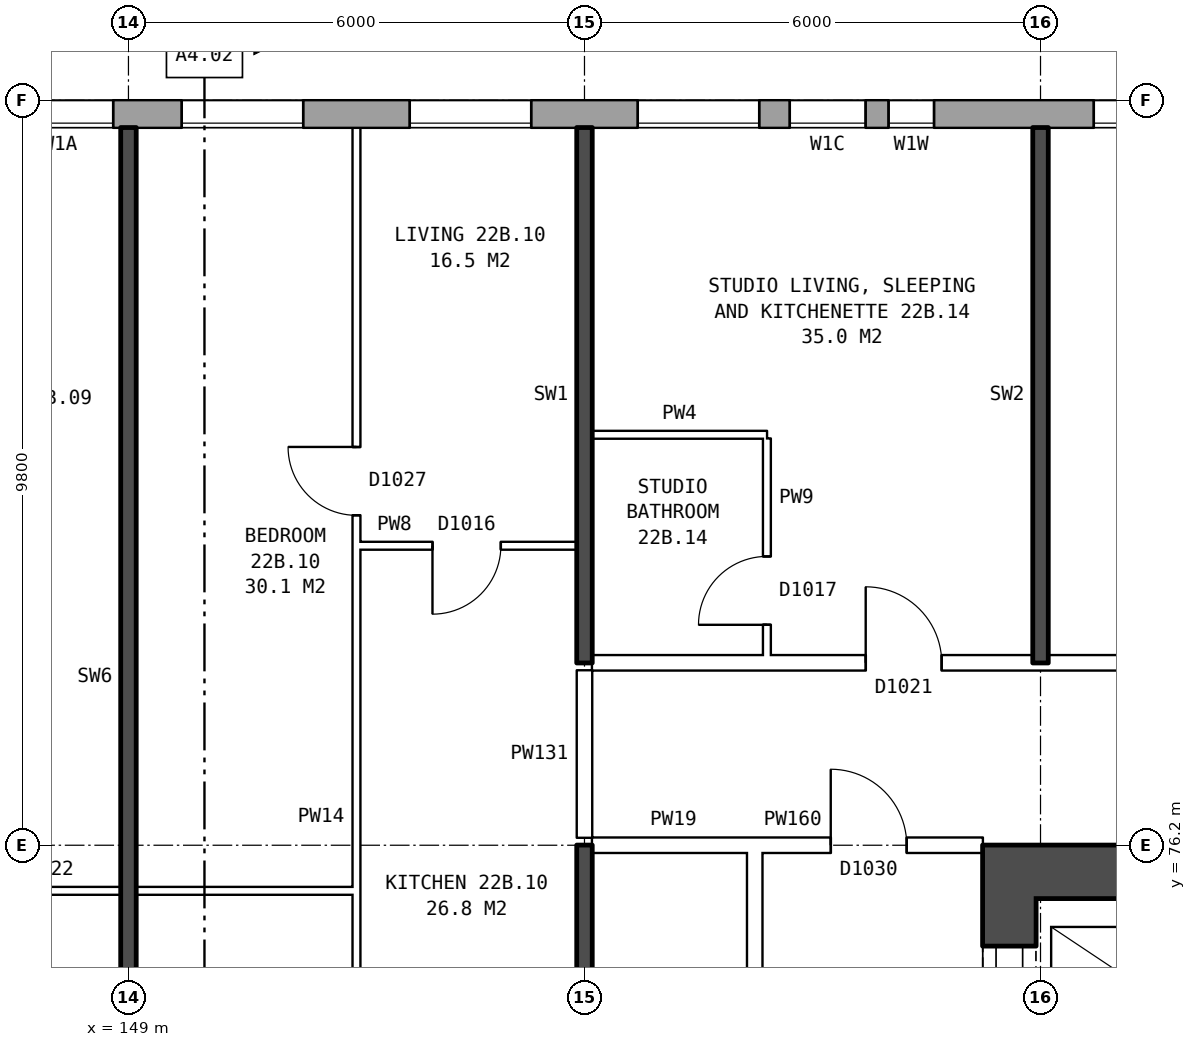
"""IFC4 building model, lengths in metres.
Left out: names, types, materials, properties, quantities, classifications, styles, units other than length and angle.
Written with IfcOpenShell. Run it as: python <this file> out.ifc"""

import sys

from ifc_helpers import new_model, si_unit, direction, frame, frame_2d, origin, place, context, subcontext, project, spatial, rectangle, extrude, element, fill, save


model = new_model("IFC4")
c1 = context("Model", 3, precision=1e-05, world=origin(), true_north=direction((0.0, 1.0)))
c2 = subcontext(c1, "Body", "Model", "MODEL_VIEW")
j1 = project(units=[si_unit("LENGTHUNIT", "METRE"), si_unit("PLANEANGLEUNIT", "RADIAN")], contexts=[c1])
p1 = place(None, origin())
s1 = spatial("IfcSite", under=j1, at=p1, CompositionType="ELEMENT")
p2 = place(p1, origin())
s2 = spatial("IfcBuilding", under=s1, at=p2, CompositionType="ELEMENT")
p3 = place(p2, frame((0.0, 0.0, 80.9)))
s3 = spatial("IfcBuildingStorey", under=s2, at=p3, CompositionType="ELEMENT", Elevation=80.9)
p4 = place(p3, frame((172.175, 85.82, 0.0), z_axis=(0.0, 0.0, 1.0), x_axis=(-1.0, 0.0, 0.0)))
e1 = element("IfcWall", 1, at=p4, inside=s3, PredefinedType="STANDARD", context=c2, shape_type="SweptSolid", body=[
    extrude(rectangle(XDim=38.101, YDim=0.36, at=frame_2d((19.05, 0.0))), origin(), (0.0, 0.0, 1.0), 2.85),
])
p5 = place(p4, frame((2.875, 0.0, 0.8)))
e2 = element("IfcOpeningElement", 2, at=p5, cuts=e1, PredefinedType="OPENING", context=c2, shape_type="SweptSolid", body=[
    extrude(rectangle(XDim=1.6, YDim=1.8, at=frame_2d((0.8, 0.9))), frame((0.0, 0.19, 0.0), z_axis=(0.0, -1.0, 0.0), x_axis=(1.0, 0.0, 0.0)), (0.0, 0.0, 1.0), 0.38),
])
p6 = place(p4, frame((5.875, 0.0, 0.8)))
e3 = element("IfcOpeningElement", 3, at=p6, cuts=e1, PredefinedType="OPENING", context=c2, shape_type="SweptSolid", body=[
    extrude(rectangle(XDim=1.6, YDim=1.8, at=frame_2d((0.8, 0.9))), frame((0.0, 0.19, 0.0), z_axis=(0.0, -1.0, 0.0), x_axis=(1.0, 0.0, 0.0)), (0.0, 0.0, 1.0), 0.38),
])
p7 = place(p4, frame((8.875, 0.0, 0.8)))
e4 = element("IfcOpeningElement", 4, at=p7, cuts=e1, PredefinedType="OPENING", context=c2, shape_type="SweptSolid", body=[
    extrude(rectangle(XDim=1.6, YDim=1.8, at=frame_2d((0.8, 0.9))), frame((0.0, 0.19, 0.0), z_axis=(0.0, -1.0, 0.0), x_axis=(1.0, 0.0, 0.0)), (0.0, 0.0, 1.0), 0.38),
])
p8 = place(p4, frame((12.575, 0.0, 0.8)))
e5 = element("IfcOpeningElement", 5, at=p8, cuts=e1, PredefinedType="OPENING", context=c2, shape_type="SweptSolid", body=[
    extrude(rectangle(XDim=0.6, YDim=0.9, at=frame_2d((0.3, 0.45))), frame((0.0, 0.19, 0.0), z_axis=(0.0, -1.0, 0.0), x_axis=(1.0, 0.0, 0.0)), (0.0, 0.0, 1.0), 0.38),
])
p9 = place(p4, frame((14.875, 0.0, 0.8)))
e6 = element("IfcOpeningElement", 6, at=p9, cuts=e1, PredefinedType="OPENING", context=c2, shape_type="SweptSolid", body=[
    extrude(rectangle(XDim=1.6, YDim=1.8, at=frame_2d((0.8, 0.9))), frame((0.0, 0.19, 0.0), z_axis=(0.0, -1.0, 0.0), x_axis=(1.0, 0.0, 0.0)), (0.0, 0.0, 1.0), 0.38),
])
p10 = place(p4, frame((17.875, 0.0, 0.8)))
e7 = element("IfcOpeningElement", 7, at=p10, cuts=e1, PredefinedType="OPENING", context=c2, shape_type="SweptSolid", body=[
    extrude(rectangle(XDim=1.6, YDim=1.8, at=frame_2d((0.8, 0.9))), frame((0.0, 0.19, 0.0), z_axis=(0.0, -1.0, 0.0), x_axis=(1.0, 0.0, 0.0)), (0.0, 0.0, 1.0), 0.38),
])
p11 = place(p4, frame((20.875, 0.0, 0.8)))
e8 = element("IfcOpeningElement", 8, at=p11, cuts=e1, PredefinedType="OPENING", context=c2, shape_type="SweptSolid", body=[
    extrude(rectangle(XDim=1.6, YDim=1.8, at=frame_2d((0.8, 0.9))), frame((0.0, 0.19, 0.0), z_axis=(0.0, -1.0, 0.0), x_axis=(1.0, 0.0, 0.0)), (0.0, 0.0, 1.0), 0.38),
])
p12 = place(p4, frame((23.375, 0.0, 0.65)))
e9 = element("IfcOpeningElement", 9, at=p12, cuts=e1, PredefinedType="OPENING", context=c2, shape_type="SweptSolid", body=[
    extrude(rectangle(XDim=1.4, YDim=1.8, at=frame_2d((0.7, 0.9))), frame((0.0, 0.19, 0.0), z_axis=(0.0, -1.0, 0.0), x_axis=(1.0, 0.0, 0.0)), (0.0, 0.0, 1.0), 0.38),
])
p13 = place(p4, frame((26.675, 0.0, 1.7)))
e10 = element("IfcOpeningElement", 10, at=p13, cuts=e1, PredefinedType="OPENING", context=c2, shape_type="SweptSolid", body=[
    extrude(rectangle(XDim=0.6, YDim=0.9, at=frame_2d((0.3, 0.45))), frame((0.0, 0.19, 0.0), z_axis=(0.0, -1.0, 0.0), x_axis=(1.0, 0.0, 0.0)), (0.0, 0.0, 1.0), 0.38),
])
p14 = place(p4, frame((29.875, 0.0, 0.8)))
e11 = element("IfcOpeningElement", 11, at=p14, cuts=e1, PredefinedType="OPENING", context=c2, shape_type="SweptSolid", body=[
    extrude(rectangle(XDim=1.6, YDim=1.8, at=frame_2d((0.8, 0.9))), frame((0.0, 0.19, 0.0), z_axis=(0.0, -1.0, 0.0), x_axis=(1.0, 0.0, 0.0)), (0.0, 0.0, 1.0), 0.38),
])
p15 = place(p4, frame((32.875, 0.0, 0.8)))
e12 = element("IfcOpeningElement", 12, at=p15, cuts=e1, PredefinedType="OPENING", context=c2, shape_type="SweptSolid", body=[
    extrude(rectangle(XDim=1.6, YDim=1.8, at=frame_2d((0.8, 0.9))), frame((0.0, 0.19, 0.0), z_axis=(0.0, -1.0, 0.0), x_axis=(1.0, 0.0, 0.0)), (0.0, 0.0, 1.0), 0.38),
])
p16 = place(p4, frame((35.875, 0.0, 0.8)))
e13 = element("IfcOpeningElement", 13, at=p16, cuts=e1, PredefinedType="OPENING", context=c2, shape_type="SweptSolid", body=[
    extrude(rectangle(XDim=1.6, YDim=1.8, at=frame_2d((0.8, 0.9))), frame((0.0, 0.19, 0.0), z_axis=(0.0, -1.0, 0.0), x_axis=(1.0, 0.0, 0.0)), (0.0, 0.0, 1.0), 0.38),
])
p17 = place(p4, frame((13.475, 0.0, 0.8)))
e14 = element("IfcOpeningElement", 14, at=p17, cuts=e1, PredefinedType="OPENING", context=c2, shape_type="SweptSolid", body=[
    extrude(rectangle(XDim=1.0, YDim=1.8, at=frame_2d((0.5, 0.9))), frame((0.0, 0.19, 0.0), z_axis=(0.0, -1.0, 0.0), x_axis=(1.0, 0.0, 0.0)), (0.0, 0.0, 1.0), 0.38),
])
p18 = place(p4, frame((25.075, 0.0, 0.55)))
e15 = element("IfcOpeningElement", 15, at=p18, cuts=e1, PredefinedType="OPENING", context=c2, shape_type="SweptSolid", body=[
    extrude(rectangle(XDim=0.6, YDim=0.9, at=frame_2d((0.3, 0.45))), frame((0.0, 0.19, 0.0), z_axis=(0.0, -1.0, 0.0), x_axis=(1.0, 0.0, 0.0)), (0.0, 0.0, 1.0), 0.38),
])
p19 = place(p4, frame((27.575, 0.0, 0.8)))
e16 = element("IfcOpeningElement", 16, at=p19, cuts=e1, PredefinedType="OPENING", context=c2, shape_type="SweptSolid", body=[
    extrude(rectangle(XDim=1.4, YDim=1.8, at=frame_2d((0.7, 0.9))), frame((0.0, 0.19, 0.0), z_axis=(0.0, -1.0, 0.0), x_axis=(1.0, 0.0, 0.0)), (0.0, 0.0, 1.0), 0.38),
])
p20 = place(p3, frame((160.59, 75.5, 0.0), z_axis=(0.0, 0.0, 1.0), x_axis=(0.0, -1.0, 0.0)))
e17 = element("IfcWall", 17, at=p20, inside=s3, PredefinedType="SHEAR", context=c2, shape_type="SweptSolid", body=[
    extrude(rectangle(XDim=11.0, YDim=0.7, at=frame_2d((5.5, 0.0))), origin(), (0.0, 0.0, 1.0), 2.85),
])
p21 = place(p20, frame((0.625, 0.0, 0.0)))
e18 = element("IfcOpeningElement", 18, at=p21, cuts=e17, PredefinedType="OPENING", context=c2, shape_type="SweptSolid", body=[
    extrude(rectangle(XDim=1.1, YDim=2.1, at=frame_2d((0.55, 1.05))), frame((0.0, 0.36, 0.0), z_axis=(0.0, -1.0, 0.0), x_axis=(1.0, 0.0, 0.0)), (0.0, 0.0, 1.0), 0.72),
])
p22 = place(p20, frame((2.9, 0.0, 0.0)))
e19 = element("IfcOpeningElement", 19, at=p22, cuts=e17, PredefinedType="OPENING", context=c2, shape_type="SweptSolid", body=[
    extrude(rectangle(XDim=1.1, YDim=2.1, at=frame_2d((0.55, 1.05))), frame((0.0, 0.36, 0.0), z_axis=(0.0, -1.0, 0.0), x_axis=(1.0, 0.0, 0.0)), (0.0, 0.0, 1.0), 0.72),
])
p23 = place(p20, frame((5.1, 0.0, 0.0)))
e20 = element("IfcOpeningElement", 20, at=p23, cuts=e17, PredefinedType="OPENING", context=c2, shape_type="SweptSolid", body=[
    extrude(rectangle(XDim=1.1, YDim=2.1, at=frame_2d((0.55, 1.05))), frame((0.0, 0.36, 0.0), z_axis=(0.0, -1.0, 0.0), x_axis=(1.0, 0.0, 0.0)), (0.0, 0.0, 1.0), 0.72),
])
p24 = place(p20, frame((9.2, 0.0, 0.0)))
e21 = element("IfcOpeningElement", 21, at=p24, cuts=e17, PredefinedType="OPENING", context=c2, shape_type="SweptSolid", body=[
    extrude(rectangle(XDim=1.1, YDim=2.1, at=frame_2d((0.55, 1.05))), frame((0.0, 0.36, 0.0), z_axis=(0.0, -1.0, 0.0), x_axis=(1.0, 0.0, 0.0)), (0.0, 0.0, 1.0), 0.72),
])
p25 = place(p20, frame((7.425, 0.0, 0.0)))
e22 = element("IfcOpeningElement", 22, at=p25, cuts=e17, PredefinedType="OPENING", context=c2, shape_type="SweptSolid", body=[
    extrude(rectangle(XDim=0.85, YDim=2.1, at=frame_2d((0.425, 1.05))), frame((0.0, 0.36, 0.0), z_axis=(0.0, -1.0, 0.0), x_axis=(1.0, 0.0, 0.0)), (0.0, 0.0, 1.0), 0.72),
])
p26 = place(p3, frame((160.24, 75.85, 0.0), z_axis=(0.0, 0.0, 1.0), x_axis=(1.0, 0.0, 0.0)))
e23 = element("IfcWall", 23, at=p26, inside=s3, PredefinedType="SHEAR", context=c2, shape_type="SweptSolid", body=[
    extrude(rectangle(XDim=8.4, YDim=0.7, at=frame_2d((4.2, 0.0))), origin(), (0.0, 0.0, 1.0), 2.85),
])
p27 = place(p3, frame((157.24, 63.9, 0.0), z_axis=(0.0, 0.0, 1.0), x_axis=(0.0, 1.0, 0.0)))
e24 = element("IfcWall", 24, at=p27, inside=s3, PredefinedType="PARTITIONING", context=c2, shape_type="SweptSolid", body=[
    extrude(rectangle(XDim=12.2, YDim=0.2, at=frame_2d((6.1, 0.0))), origin(), (0.0, 0.0, 1.0), 2.85),
])
p28 = place(p27, frame((5.1, 0.0, 0.0)))
e25 = element("IfcOpeningElement", 25, at=p28, cuts=e24, PredefinedType="OPENING", context=c2, shape_type="SweptSolid", body=[
    extrude(rectangle(XDim=2.0, YDim=2.1, at=frame_2d((1.0, 1.05))), frame((0.0, 0.11, 0.0), z_axis=(0.0, -1.0, 0.0), x_axis=(1.0, 0.0, 0.0)), (0.0, 0.0, 1.0), 0.22),
])
p29 = place(p3, frame((146.0, 75.6, 0.0), z_axis=(0.0, 0.0, 1.0), x_axis=(1.0, 0.0, 0.0)))
e26 = element("IfcWall", 26, at=p29, inside=s3, PredefinedType="PARTITIONING", context=c2, shape_type="SweptSolid", body=[
    extrude(rectangle(XDim=6.0, YDim=0.1, at=frame_2d((3.0, 0.0))), origin(), (0.0, 0.0, 1.0), 2.85),
])
p30 = place(p3, frame((155.1, 76.2, 0.0), z_axis=(0.0, 0.0, 1.0), x_axis=(1.0, 0.0, 0.0)))
e27 = element("IfcWall", 27, at=p30, inside=s3, PredefinedType="PARTITIONING", context=c2, shape_type="SweptSolid", body=[
    extrude(rectangle(XDim=2.14, YDim=0.2, at=frame_2d((1.07, 0.0))), origin(), (0.0, 0.0, 1.0), 2.85),
])
p31 = place(p3, frame((157.24, 76.2, 0.0), z_axis=(0.0, 0.0, 1.0), x_axis=(1.0, 0.0, 0.0)))
e28 = element("IfcWall", 28, at=p31, inside=s3, PredefinedType="PARTITIONING", context=c2, shape_type="SweptSolid", body=[
    extrude(rectangle(XDim=3.0, YDim=0.2, at=frame_2d((1.5, 0.0))), origin(), (0.0, 0.0, 1.0), 2.85),
])
p32 = place(p31, frame((1.0, 0.0, 0.0)))
e29 = element("IfcOpeningElement", 29, at=p32, cuts=e28, PredefinedType="OPENING", context=c2, shape_type="SweptSolid", body=[
    extrude(rectangle(XDim=1.0, YDim=2.1, at=frame_2d((0.5, 1.05))), frame((0.0, 0.11, 0.0), z_axis=(0.0, -1.0, 0.0), x_axis=(1.0, 0.0, 0.0)), (0.0, 0.0, 1.0), 0.22),
])
p33 = place(p3, frame((155.1, 78.6, 0.0), z_axis=(0.0, 0.0, 1.0), x_axis=(1.0, 0.0, 0.0)))
e30 = element("IfcWall", 30, at=p33, inside=s3, PredefinedType="PARTITIONING", context=c2, shape_type="SweptSolid", body=[
    extrude(rectangle(XDim=19.79, YDim=0.2, at=frame_2d((9.895, 0.0))), origin(), (0.0, 0.0, 1.0), 2.85),
])
p34 = place(p33, frame((3.6, 0.0, 0.0)))
e31 = element("IfcOpeningElement", 31, at=p34, cuts=e30, PredefinedType="OPENING", context=c2, shape_type="SweptSolid", body=[
    extrude(rectangle(XDim=1.0, YDim=2.1, at=frame_2d((0.5, 1.05))), frame((0.0, 0.11, 0.0), z_axis=(0.0, -1.0, 0.0), x_axis=(1.0, 0.0, 0.0)), (0.0, 0.0, 1.0), 0.22),
])
p35 = place(p33, frame((7.4, 0.0, 0.0)))
e32 = element("IfcOpeningElement", 32, at=p35, cuts=e30, PredefinedType="OPENING", context=c2, shape_type="SweptSolid", body=[
    extrude(rectangle(XDim=1.0, YDim=2.1, at=frame_2d((0.5, 1.05))), frame((0.0, 0.11, 0.0), z_axis=(0.0, -1.0, 0.0), x_axis=(1.0, 0.0, 0.0)), (0.0, 0.0, 1.0), 0.22),
])
p36 = place(p33, frame((16.545, 0.0, 0.0)))
e33 = element("IfcOpeningElement", 33, at=p36, cuts=e30, PredefinedType="OPENING", context=c2, shape_type="SweptSolid", body=[
    extrude(rectangle(XDim=1.0, YDim=2.1, at=frame_2d((0.5, 1.05))), frame((0.0, 0.11, 0.0), z_axis=(0.0, -1.0, 0.0), x_axis=(1.0, 0.0, 0.0)), (0.0, 0.0, 1.0), 0.22),
])
p37 = place(p3, frame((152.0, 80.14, 0.0), z_axis=(0.0, 0.0, 1.0), x_axis=(1.0, 0.0, 0.0)))
e34 = element("IfcWall", 34, at=p37, inside=s3, PredefinedType="PARTITIONING", context=c2, shape_type="SweptSolid", body=[
    extrude(rectangle(XDim=2.9, YDim=0.1, at=frame_2d((1.45, 0.0))), origin(), (0.0, 0.0, 1.0), 2.85),
])
p38 = place(p37, frame((1.0, 0.0, 0.0)))
e35 = element("IfcOpeningElement", 35, at=p38, cuts=e34, PredefinedType="OPENING", context=c2, shape_type="SweptSolid", body=[
    extrude(rectangle(XDim=0.9, YDim=2.1, at=frame_2d((0.45, 1.05))), frame((0.0, 0.06, 0.0), z_axis=(0.0, -1.0, 0.0), x_axis=(1.0, 0.0, 0.0)), (0.0, 0.0, 1.0), 0.12),
])
p39 = place(p3, frame((155.1, 81.6, 0.0), z_axis=(0.0, 0.0, 1.0), x_axis=(1.0, 0.0, 0.0)))
e36 = element("IfcWall", 36, at=p39, inside=s3, PredefinedType="PARTITIONING", context=c2, shape_type="SweptSolid", body=[
    extrude(rectangle(XDim=2.3, YDim=0.1, at=frame_2d((1.15, 0.0))), origin(), (0.0, 0.0, 1.0), 2.85),
])
p40 = place(p3, frame((149.0, 71.2, 0.0), z_axis=(0.0, 0.0, 1.0), x_axis=(0.0, 1.0, 0.0)))
e37 = element("IfcWall", 37, at=p40, inside=s3, PredefinedType="SOLIDWALL", context=c2, shape_type="SweptSolid", body=[
    extrude(rectangle(XDim=14.44, YDim=0.2, at=frame_2d((7.22, 0.0))), origin(), (0.0, 0.0, 1.0), 2.85),
])
p41 = place(p3, frame((152.0, 71.3, 0.0), z_axis=(0.0, 0.0, 1.0), x_axis=(0.0, 1.0, 0.0)))
e38 = element("IfcWall", 38, at=p41, inside=s3, PredefinedType="PARTITIONING", context=c2, shape_type="SweptSolid", body=[
    extrude(rectangle(XDim=14.34, YDim=0.1, at=frame_2d((7.17, 0.0))), origin(), (0.0, 0.0, 1.0), 2.85),
])
p42 = place(p41, frame((9.24, 0.0, 0.0)))
e39 = element("IfcOpeningElement", 39, at=p42, cuts=e38, PredefinedType="OPENING", context=c2, shape_type="SweptSolid", body=[
    extrude(rectangle(XDim=0.9, YDim=2.1, at=frame_2d((0.45, 1.05))), frame((0.0, 0.06, 0.0), z_axis=(0.0, -1.0, 0.0), x_axis=(1.0, 0.0, 0.0)), (0.0, 0.0, 1.0), 0.12),
])
p43 = place(p41, frame((0.4, 0.0, 0.0)))
e40 = element("IfcOpeningElement", 40, at=p43, cuts=e38, PredefinedType="OPENING", context=c2, shape_type="SweptSolid", body=[
    extrude(rectangle(XDim=0.9, YDim=2.1, at=frame_2d((0.45, 1.05))), frame((0.0, 0.06, 0.0), z_axis=(0.0, -1.0, 0.0), x_axis=(1.0, 0.0, 0.0)), (0.0, 0.0, 1.0), 0.12),
])
p44 = place(p3, frame((155.0, 71.2, 0.0), z_axis=(0.0, 0.0, 1.0), x_axis=(0.0, 1.0, 0.0)))
e41 = element("IfcWall", 41, at=p44, inside=s3, PredefinedType="SOLIDWALL", context=c2, shape_type="SweptSolid", body=[
    extrude(rectangle(XDim=5.0, YDim=0.2, at=frame_2d((2.5, 0.0))), origin(), (0.0, 0.0, 1.0), 2.85),
])
p45 = place(p3, frame((155.0, 76.3, 0.0), z_axis=(0.0, 0.0, 1.0), x_axis=(0.0, 1.0, 0.0)))
e42 = element("IfcWall", 42, at=p45, inside=s3, PredefinedType="PARTITIONING", context=c2, shape_type="SweptSolid", body=[
    extrude(rectangle(XDim=2.2, YDim=0.2, at=frame_2d((1.1, 0.0))), origin(), (0.0, 0.0, 1.0), 2.85),
])
p46 = place(p3, frame((155.0, 78.6, 0.0), z_axis=(0.0, 0.0, 1.0), x_axis=(0.0, 1.0, 0.0)))
e43 = element("IfcWall", 43, at=p46, inside=s3, PredefinedType="SOLIDWALL", context=c2, shape_type="SweptSolid", body=[
    extrude(rectangle(XDim=7.04, YDim=0.2, at=frame_2d((3.52, 0.0))), origin(), (0.0, 0.0, 1.0), 2.85),
])
p47 = place(p3, frame((157.4, 78.7, 0.0), z_axis=(0.0, 0.0, 1.0), x_axis=(0.0, 1.0, 0.0)))
e44 = element("IfcWall", 44, at=p47, inside=s3, PredefinedType="PARTITIONING", context=c2, shape_type="SweptSolid", body=[
    extrude(rectangle(XDim=2.85, YDim=0.1, at=frame_2d((1.425, 0.0))), origin(), (0.0, 0.0, 1.0), 2.85),
])
p48 = place(p47, frame((0.4, 0.0, 0.0)))
e45 = element("IfcOpeningElement", 45, at=p48, cuts=e44, PredefinedType="OPENING", context=c2, shape_type="SweptSolid", body=[
    extrude(rectangle(XDim=0.9, YDim=2.1, at=frame_2d((0.45, 1.05))), frame((0.0, 0.06, 0.0), z_axis=(0.0, -1.0, 0.0), x_axis=(1.0, 0.0, 0.0)), (0.0, 0.0, 1.0), 0.12),
])
p49 = place(p3, frame((161.0, 78.6, 0.0), z_axis=(0.0, 0.0, 1.0), x_axis=(0.0, 1.0, 0.0)))
e46 = element("IfcWall", 46, at=p49, inside=s3, PredefinedType="SOLIDWALL", context=c2, shape_type="SweptSolid", body=[
    extrude(rectangle(XDim=7.04, YDim=0.2, at=frame_2d((3.52, 0.0))), origin(), (0.0, 0.0, 1.0), 2.85),
])
p50 = place(p7, origin())
e47 = element("IfcWindow", 47, at=p50, inside=s3, PartitioningType="SINGLE_PANEL", PredefinedType="WINDOW", context=c2, shape_type="SweptSolid", body=[
    extrude(rectangle(XDim=1.6, YDim=1.8, at=frame_2d((0.8, 0.9))), frame((0.0, 0.15, 0.0), z_axis=(0.0, -1.0, 0.0), x_axis=(1.0, 0.0, 0.0)), (0.0, 0.0, 1.0), 0.06),
])
fill(e4, e47)
p51 = place(p8, origin())
e48 = element("IfcWindow", 48, at=p51, inside=s3, PartitioningType="SINGLE_PANEL", PredefinedType="WINDOW", context=c2, shape_type="SweptSolid", body=[
    extrude(rectangle(XDim=0.6, YDim=0.9, at=frame_2d((0.3, 0.45))), frame((0.0, 0.15, 0.0), z_axis=(0.0, -1.0, 0.0), x_axis=(1.0, 0.0, 0.0)), (0.0, 0.0, 1.0), 0.06),
])
fill(e5, e48)
p52 = place(p9, origin())
e49 = element("IfcWindow", 49, at=p52, inside=s3, PartitioningType="SINGLE_PANEL", PredefinedType="WINDOW", context=c2, shape_type="SweptSolid", body=[
    extrude(rectangle(XDim=1.6, YDim=1.8, at=frame_2d((0.8, 0.9))), frame((0.0, 0.15, 0.0), z_axis=(0.0, -1.0, 0.0), x_axis=(1.0, 0.0, 0.0)), (0.0, 0.0, 1.0), 0.06),
])
fill(e6, e49)
p53 = place(p10, origin())
e50 = element("IfcWindow", 50, at=p53, inside=s3, PartitioningType="SINGLE_PANEL", PredefinedType="WINDOW", context=c2, shape_type="SweptSolid", body=[
    extrude(rectangle(XDim=1.6, YDim=1.8, at=frame_2d((0.8, 0.9))), frame((0.0, 0.15, 0.0), z_axis=(0.0, -1.0, 0.0), x_axis=(1.0, 0.0, 0.0)), (0.0, 0.0, 1.0), 0.06),
])
fill(e7, e50)
p54 = place(p11, origin())
e51 = element("IfcWindow", 51, at=p54, inside=s3, PartitioningType="SINGLE_PANEL", PredefinedType="WINDOW", context=c2, shape_type="SweptSolid", body=[
    extrude(rectangle(XDim=1.6, YDim=1.8, at=frame_2d((0.8, 0.9))), frame((0.0, 0.15, 0.0), z_axis=(0.0, -1.0, 0.0), x_axis=(1.0, 0.0, 0.0)), (0.0, 0.0, 1.0), 0.06),
])
fill(e8, e51)
p55 = place(p12, origin())
e52 = element("IfcWindow", 52, at=p55, inside=s3, PartitioningType="SINGLE_PANEL", PredefinedType="WINDOW", context=c2, shape_type="SweptSolid", body=[
    extrude(rectangle(XDim=1.4, YDim=1.8, at=frame_2d((0.7, 0.9))), frame((0.0, 0.15, 0.0), z_axis=(0.0, -1.0, 0.0), x_axis=(1.0, 0.0, 0.0)), (0.0, 0.0, 1.0), 0.06),
])
fill(e9, e52)
p56 = place(p21, origin())
e53 = element("IfcDoor", 53, at=p56, inside=s3, OperationType="DOUBLE_DOOR_SLIDING", PredefinedType="DOOR", context=c2, shape_type="SweptSolid", body=[
    extrude(rectangle(XDim=1.1, YDim=2.1, at=frame_2d((0.55, 1.05))), frame((0.0, 0.335, 0.0), z_axis=(0.0, -1.0, 0.0), x_axis=(1.0, 0.0, 0.0)), (0.0, 0.0, 1.0), 0.05),
])
fill(e18, e53)
p57 = place(p32, origin())
e54 = element("IfcDoor", 54, at=p57, inside=s3, OperationType="SINGLE_SWING_LEFT", PredefinedType="DOOR", context=c2, shape_type="SweptSolid", body=[
    extrude(rectangle(XDim=1.0, YDim=2.1, at=frame_2d((0.5, 1.05))), frame((0.0, 0.025, 0.0), z_axis=(0.0, -1.0, 0.0), x_axis=(1.0, 0.0, 0.0)), (0.0, 0.0, 1.0), 0.05),
])
fill(e29, e54)
p58 = place(p42, origin())
e55 = element("IfcDoor", 55, at=p58, inside=s3, OperationType="SINGLE_SWING_RIGHT", PredefinedType="DOOR", context=c2, shape_type="SweptSolid", body=[
    extrude(rectangle(XDim=0.9, YDim=2.1, at=frame_2d((0.45, 1.05))), frame((0.0, 0.025, 0.0), z_axis=(0.0, -1.0, 0.0), x_axis=(1.0, 0.0, 0.0)), (0.0, 0.0, 1.0), 0.05),
])
fill(e39, e55)
p59 = place(p38, frame((0.9, 0.0, 0.0), z_axis=(0.0, 0.0, 1.0), x_axis=(-1.0, 0.0, 0.0)))
e56 = element("IfcDoor", 56, at=p59, inside=s3, OperationType="SINGLE_SWING_RIGHT", PredefinedType="DOOR", context=c2, shape_type="SweptSolid", body=[
    extrude(rectangle(XDim=0.9, YDim=2.1, at=frame_2d((0.45, 1.05))), frame((0.0, 0.025, 0.0), z_axis=(0.0, -1.0, 0.0), x_axis=(1.0, 0.0, 0.0)), (0.0, 0.0, 1.0), 0.05),
])
fill(e35, e56)
p60 = place(p34, origin())
e57 = element("IfcDoor", 57, at=p60, inside=s3, OperationType="SINGLE_SWING_LEFT", PredefinedType="DOOR", context=c2, shape_type="SweptSolid", body=[
    extrude(rectangle(XDim=1.0, YDim=2.1, at=frame_2d((0.5, 1.05))), frame((0.0, 0.025, 0.0), z_axis=(0.0, -1.0, 0.0), x_axis=(1.0, 0.0, 0.0)), (0.0, 0.0, 1.0), 0.05),
])
fill(e31, e57)
p61 = place(p48, origin())
e58 = element("IfcDoor", 58, at=p61, inside=s3, OperationType="SINGLE_SWING_LEFT", PredefinedType="DOOR", context=c2, shape_type="SweptSolid", body=[
    extrude(rectangle(XDim=0.9, YDim=2.1, at=frame_2d((0.45, 1.05))), frame((0.0, 0.025, 0.0), z_axis=(0.0, -1.0, 0.0), x_axis=(1.0, 0.0, 0.0)), (0.0, 0.0, 1.0), 0.05),
])
fill(e45, e58)
p62 = place(p17, origin())
e59 = element("IfcWindow", 59, at=p62, inside=s3, PartitioningType="SINGLE_PANEL", PredefinedType="WINDOW", context=c2, shape_type="SweptSolid", body=[
    extrude(rectangle(XDim=1.0, YDim=1.8, at=frame_2d((0.5, 0.9))), frame((0.0, 0.15, 0.0), z_axis=(0.0, -1.0, 0.0), x_axis=(1.0, 0.0, 0.0)), (0.0, 0.0, 1.0), 0.06),
])
fill(e14, e59)
save(model, sys.argv[1])
